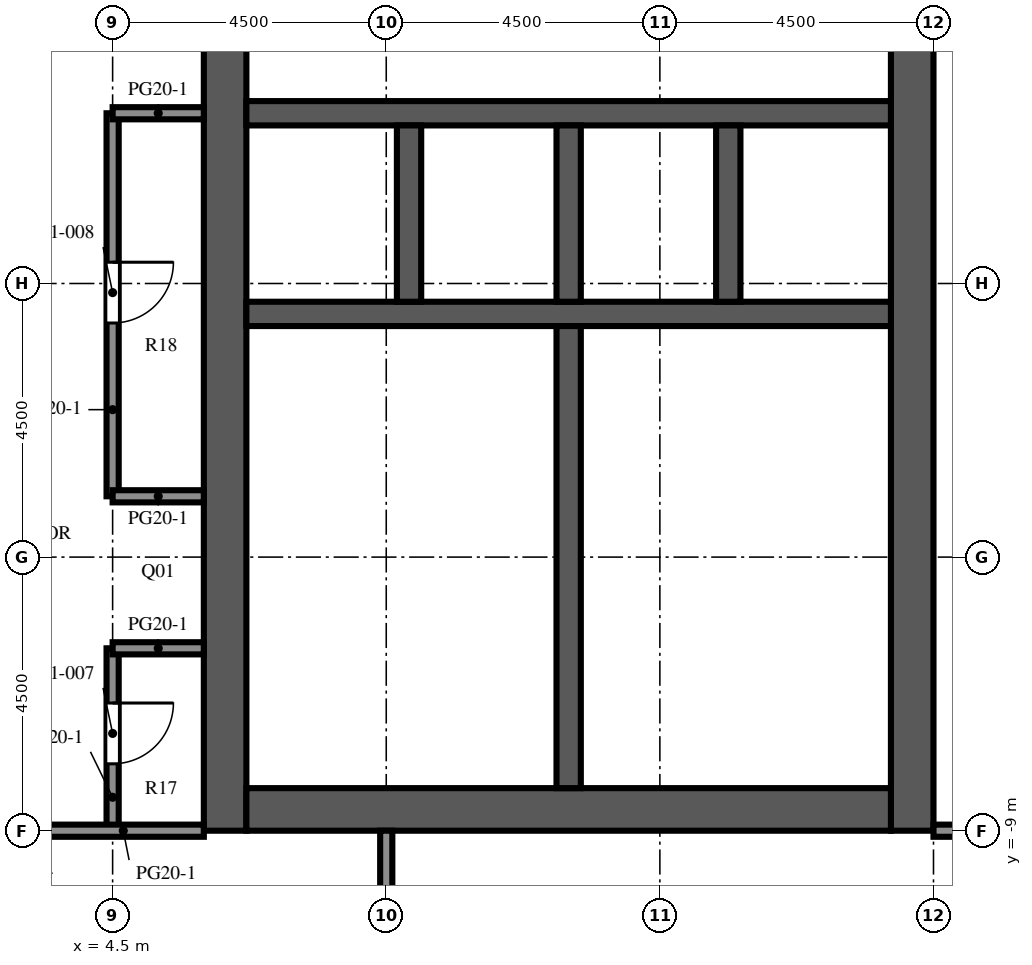
"""IFC4 building model, lengths in metres.
Left out: names, types, materials, properties, quantities, classifications, styles, units other than length and angle.
Written with IfcOpenShell. Run it as: python <this file> out.ifc"""

import sys

from ifc_helpers import new_model, si_unit, direction, frame, frame_2d, origin, place, context, subcontext, project, spatial, rectangle, extrude, element, fill, save


model = new_model("IFC4")
c1 = context("Model", 3, precision=1e-05, world=origin(), true_north=direction((0.0, 1.0)))
c2 = subcontext(c1, "Body", "Model", "MODEL_VIEW")
j1 = project(units=[si_unit("LENGTHUNIT", "METRE"), si_unit("PLANEANGLEUNIT", "RADIAN")], contexts=[c1])
p1 = place(None, origin())
s1 = spatial("IfcSite", under=j1, at=p1, CompositionType="ELEMENT")
p2 = place(p1, origin())
s2 = spatial("IfcBuilding", under=s1, at=p2, CompositionType="ELEMENT")
p3 = place(p2, frame((0.0, 0.0, 278.6)))
s3 = spatial("IfcBuildingStorey", under=s2, at=p3, CompositionType="ELEMENT", Elevation=278.6)
p4 = place(p3, frame((6.35, -9.0, 0.0), z_axis=(0.0, 0.0, 1.0), x_axis=(0.0, 1.0, 0.0)))
e1 = element("IfcWall", 1, at=p4, inside=s3, PredefinedType="SHEAR", context=c2, shape_type="SweptSolid", body=[
    extrude(rectangle(XDim=27.5, YDim=0.7, at=frame_2d((13.75, 0.0))), origin(), (0.0, 0.0, 1.0), 4.1),
])
p5 = place(p4, frame((12.55, 0.0, 0.0)))
e2 = element("IfcOpeningElement", 2, at=p5, cuts=e1, PredefinedType="OPENING", context=c2, shape_type="SweptSolid", body=[
    extrude(rectangle(XDim=2.4, YDim=2.4, at=frame_2d((1.2, 1.2))), frame((0.0, 0.36, 0.0), z_axis=(0.0, -1.0, 0.0), x_axis=(1.0, 0.0, 0.0)), (0.0, 0.0, 1.0), 0.72),
])
p6 = place(p4, frame((3.9, 0.0, 0.0)))
e3 = element("IfcOpeningElement", 3, at=p6, cuts=e1, PredefinedType="OPENING", context=c2, shape_type="SweptSolid", body=[
    extrude(rectangle(XDim=1.2, YDim=2.1, at=frame_2d((0.6, 1.05))), frame((0.0, 0.36, 0.0), z_axis=(0.0, -1.0, 0.0), x_axis=(1.0, 0.0, 0.0)), (0.0, 0.0, 1.0), 0.72),
])
p7 = place(p4, frame((19.46, 0.0, 0.0)))
e4 = element("IfcOpeningElement", 4, at=p7, cuts=e1, PredefinedType="OPENING", context=c2, shape_type="SweptSolid", body=[
    extrude(rectangle(XDim=1.0, YDim=2.1, at=frame_2d((0.5, 1.05))), frame((0.0, 0.36, 0.0), z_axis=(0.0, -1.0, 0.0), x_axis=(1.0, 0.0, 0.0)), (0.0, 0.0, 1.0), 0.72),
])
p8 = place(p4, frame((21.17, 0.0, 0.0)))
e5 = element("IfcOpeningElement", 5, at=p8, cuts=e1, PredefinedType="OPENING", context=c2, shape_type="SweptSolid", body=[
    extrude(rectangle(XDim=1.0, YDim=2.1, at=frame_2d((0.5, 1.05))), frame((0.0, 0.36, 0.0), z_axis=(0.0, -1.0, 0.0), x_axis=(1.0, 0.0, 0.0)), (0.0, 0.0, 1.0), 0.72),
])
p9 = place(p4, frame((23.26, 0.0, 0.0)))
e6 = element("IfcOpeningElement", 6, at=p9, cuts=e1, PredefinedType="OPENING", context=c2, shape_type="SweptSolid", body=[
    extrude(rectangle(XDim=1.0, YDim=2.1, at=frame_2d((0.5, 1.05))), frame((0.0, 0.36, 0.0), z_axis=(0.0, -1.0, 0.0), x_axis=(1.0, 0.0, 0.0)), (0.0, 0.0, 1.0), 0.72),
])
p10 = place(p4, frame((25.35, 0.0, 0.0)))
e7 = element("IfcOpeningElement", 7, at=p10, cuts=e1, PredefinedType="OPENING", context=c2, shape_type="SweptSolid", body=[
    extrude(rectangle(XDim=1.0, YDim=2.1, at=frame_2d((0.5, 1.05))), frame((0.0, 0.36, 0.0), z_axis=(0.0, -1.0, 0.0), x_axis=(1.0, 0.0, 0.0)), (0.0, 0.0, 1.0), 0.72),
])
p11 = place(p3, frame((17.65, -9.0, 0.0), z_axis=(0.0, 0.0, 1.0), x_axis=(0.0, 1.0, 0.0)))
e8 = element("IfcWall", 8, at=p11, inside=s3, PredefinedType="SHEAR", context=c2, shape_type="SweptSolid", body=[
    extrude(rectangle(XDim=27.5, YDim=0.7, at=frame_2d((13.75, 0.0))), origin(), (0.0, 0.0, 1.0), 4.1),
])
p12 = place(p11, frame((12.55, 0.0, 0.0)))
e9 = element("IfcOpeningElement", 9, at=p12, cuts=e8, PredefinedType="OPENING", context=c2, shape_type="SweptSolid", body=[
    extrude(rectangle(XDim=2.4, YDim=2.4, at=frame_2d((1.2, 1.2))), frame((0.0, 0.36, 0.0), z_axis=(0.0, -1.0, 0.0), x_axis=(1.0, 0.0, 0.0)), (0.0, 0.0, 1.0), 0.72),
])
p13 = place(p11, frame((6.825, 0.0, 0.0)))
e10 = element("IfcOpeningElement", 10, at=p13, cuts=e8, PredefinedType="OPENING", context=c2, shape_type="SweptSolid", body=[
    extrude(rectangle(XDim=1.2, YDim=2.1, at=frame_2d((0.6, 1.05))), frame((0.0, 0.36, 0.0), z_axis=(0.0, -1.0, 0.0), x_axis=(1.0, 0.0, 0.0)), (0.0, 0.0, 1.0), 0.72),
])
p14 = place(p11, frame((19.475, 0.0, 0.0)))
e11 = element("IfcOpeningElement", 11, at=p14, cuts=e8, PredefinedType="OPENING", context=c2, shape_type="SweptSolid", body=[
    extrude(rectangle(XDim=1.2, YDim=2.1, at=frame_2d((0.6, 1.05))), frame((0.0, 0.36, 0.0), z_axis=(0.0, -1.0, 0.0), x_axis=(1.0, 0.0, 0.0)), (0.0, 0.0, 1.0), 0.72),
])
p15 = place(p3, frame((6.7, -8.65, 0.0), z_axis=(0.0, 0.0, 1.0), x_axis=(1.0, 0.0, 0.0)))
e12 = element("IfcWall", 12, at=p15, inside=s3, PredefinedType="SHEAR", context=c2, shape_type="SweptSolid", body=[
    extrude(rectangle(XDim=10.6, YDim=0.7, at=frame_2d((5.3, 0.0))), origin(), (0.0, 0.0, 1.0), 4.1),
])
p16 = place(p3, frame((6.7, -0.5, 0.0), z_axis=(0.0, 0.0, 1.0), x_axis=(1.0, 0.0, 0.0)))
e13 = element("IfcWall", 13, at=p16, inside=s3, PredefinedType="SHEAR", context=c2, shape_type="SweptSolid", body=[
    extrude(rectangle(XDim=10.6, YDim=0.4, at=frame_2d((5.3, 0.0))), origin(), (0.0, 0.0, 1.0), 4.1),
])
p17 = place(p3, frame((6.7, 2.8, 0.0), z_axis=(0.0, 0.0, 1.0), x_axis=(1.0, 0.0, 0.0)))
e14 = element("IfcWall", 14, at=p17, inside=s3, PredefinedType="SHEAR", context=c2, shape_type="SweptSolid", body=[
    extrude(rectangle(XDim=10.6, YDim=0.4, at=frame_2d((5.3, 0.0))), origin(), (0.0, 0.0, 1.0), 4.1),
])
p18 = place(p17, frame((0.688, 0.0, 0.0)))
e15 = element("IfcOpeningElement", 15, at=p18, cuts=e14, PredefinedType="OPENING", context=c2, shape_type="SweptSolid", body=[
    extrude(rectangle(XDim=1.1, YDim=2.1, at=frame_2d((0.55, 1.05))), frame((0.0, 0.21, 0.0), z_axis=(0.0, -1.0, 0.0), x_axis=(1.0, 0.0, 0.0)), (0.0, 0.0, 1.0), 0.42),
])
p19 = place(p17, frame((3.438, 0.0, 0.0)))
e16 = element("IfcOpeningElement", 16, at=p19, cuts=e14, PredefinedType="OPENING", context=c2, shape_type="SweptSolid", body=[
    extrude(rectangle(XDim=1.1, YDim=2.1, at=frame_2d((0.55, 1.05))), frame((0.0, 0.21, 0.0), z_axis=(0.0, -1.0, 0.0), x_axis=(1.0, 0.0, 0.0)), (0.0, 0.0, 1.0), 0.42),
])
p20 = place(p17, frame((6.113, 0.0, 0.0)))
e17 = element("IfcOpeningElement", 17, at=p20, cuts=e14, PredefinedType="OPENING", context=c2, shape_type="SweptSolid", body=[
    extrude(rectangle(XDim=1.0, YDim=2.1, at=frame_2d((0.5, 1.05))), frame((0.0, 0.21, 0.0), z_axis=(0.0, -1.0, 0.0), x_axis=(1.0, 0.0, 0.0)), (0.0, 0.0, 1.0), 0.42),
])
p21 = place(p17, frame((8.863, 0.0, 0.0)))
e18 = element("IfcOpeningElement", 18, at=p21, cuts=e14, PredefinedType="OPENING", context=c2, shape_type="SweptSolid", body=[
    extrude(rectangle(XDim=1.0, YDim=2.1, at=frame_2d((0.5, 1.05))), frame((0.0, 0.21, 0.0), z_axis=(0.0, -1.0, 0.0), x_axis=(1.0, 0.0, 0.0)), (0.0, 0.0, 1.0), 0.42),
])
for number, where, z_axis, x_axis in (
    (19, (9.375, -0.3, 0.0), (0.0, 0.0, 1.0), (0.0, 1.0, 0.0)),
    (20, (12.0, -0.3, 0.0), (0.0, 0.0, 1.0), (0.0, 1.0, 0.0)),
    (21, (14.625, -0.3, 0.0), (0.0, 0.0, 1.0), (0.0, 1.0, 0.0)),
):
    element("IfcWall", number, at=place(p3, frame(where, z_axis=z_axis, x_axis=x_axis)), inside=s3, PredefinedType="SHEAR", context=c2, shape_type="SweptSolid", body=[
        extrude(rectangle(XDim=2.9, YDim=0.4, at=frame_2d((1.45, 0.0))), origin(), (0.0, 0.0, 1.0), 4.1),
    ])
p22 = place(p3, frame((12.0, -8.3, 0.0), z_axis=(0.0, 0.0, 1.0), x_axis=(0.0, 1.0, 0.0)))
e22 = element("IfcWall", 22, at=p22, inside=s3, PredefinedType="SHEAR", context=c2, shape_type="SweptSolid", body=[
    extrude(rectangle(XDim=7.6, YDim=0.4, at=frame_2d((3.8, 0.0))), origin(), (0.0, 0.0, 1.0), 4.1),
])
p23 = place(p3, frame((6.7, -6.02, 0.0), z_axis=(0.0, 0.0, 1.0), x_axis=(1.0, 0.0, 0.0)))
e23 = element("IfcWall", 23, at=p23, inside=s3, PredefinedType="PARTITIONING", context=c2, shape_type="SweptSolid", body=[
    extrude(rectangle(XDim=1.6, YDim=0.1, at=frame_2d((0.8, 0.0))), origin(), (0.0, 0.0, 1.0), 3.65),
])
p24 = place(p23, frame((0.3, 0.0, 0.0)))
e24 = element("IfcOpeningElement", 24, at=p24, cuts=e23, PredefinedType="OPENING", context=c2, shape_type="SweptSolid", body=[
    extrude(rectangle(XDim=1.0, YDim=2.1, at=frame_2d((0.5, 1.05))), frame((0.0, 0.06, 0.0), z_axis=(0.0, -1.0, 0.0), x_axis=(1.0, 0.0, 0.0)), (0.0, 0.0, 1.0), 0.12),
])
p25 = place(p3, frame((6.7, -2.98, 0.0), z_axis=(0.0, 0.0, 1.0), x_axis=(1.0, 0.0, 0.0)))
e25 = element("IfcWall", 25, at=p25, inside=s3, PredefinedType="PARTITIONING", context=c2, shape_type="SweptSolid", body=[
    extrude(rectangle(XDim=1.6, YDim=0.1, at=frame_2d((0.8, 0.0))), origin(), (0.0, 0.0, 1.0), 3.65),
])
p26 = place(p25, frame((0.3, 0.0, 0.0)))
e26 = element("IfcOpeningElement", 26, at=p26, cuts=e25, PredefinedType="OPENING", context=c2, shape_type="SweptSolid", body=[
    extrude(rectangle(XDim=1.0, YDim=2.1, at=frame_2d((0.5, 1.05))), frame((0.0, 0.06, 0.0), z_axis=(0.0, -1.0, 0.0), x_axis=(1.0, 0.0, 0.0)), (0.0, 0.0, 1.0), 0.12),
])
p27 = place(p3, frame((8.3, -6.02, 0.0), z_axis=(0.0, 0.0, 1.0), x_axis=(0.0, 1.0, 0.0)))
e27 = element("IfcWall", 27, at=p27, inside=s3, PredefinedType="PARTITIONING", context=c2, shape_type="SweptSolid", body=[
    extrude(rectangle(XDim=3.04, YDim=0.1, at=frame_2d((1.52, 0.0))), origin(), (0.0, 0.0, 1.0), 3.65),
])
p28 = place(p27, frame((1.02, 0.0, 0.0)))
e28 = element("IfcOpeningElement", 28, at=p28, cuts=e27, PredefinedType="OPENING", context=c2, shape_type="SweptSolid", body=[
    extrude(rectangle(XDim=1.0, YDim=2.1, at=frame_2d((0.5, 1.05))), frame((0.0, 0.06, 0.0), z_axis=(0.0, -1.0, 0.0), x_axis=(1.0, 0.0, 0.0)), (0.0, 0.0, 1.0), 0.12),
])
for number, where, z_axis, x_axis in (
    (29, (8.3, -6.02, 0.0), (0.0, 0.0, 1.0), (1.0, 0.0, 0.0)),
    (30, (8.3, -2.98, 0.0), (0.0, 0.0, 1.0), (1.0, 0.0, 0.0)),
):
    element("IfcWall", number, at=place(p3, frame(where, z_axis=z_axis, x_axis=x_axis)), inside=s3, PredefinedType="PARTITIONING", context=c2, shape_type="SweptSolid", body=[
        extrude(rectangle(XDim=3.5, YDim=0.1, at=frame_2d((1.75, 0.0))), origin(), (0.0, 0.0, 1.0), 3.65),
    ])
p29 = place(p3, frame((4.5, -6.0, 0.0), z_axis=(0.0, 0.0, 1.0), x_axis=(0.0, -1.0, 0.0)))
e31 = element("IfcWall", 31, at=p29, inside=s3, PredefinedType="PARTITIONING", context=c2, shape_type="SweptSolid", body=[
    extrude(rectangle(XDim=3.0, YDim=0.2, at=frame_2d((1.5, 0.0))), origin(), (0.0, 0.0, 1.0), 3.65),
])
p30 = place(p29, frame((0.9, 0.0, 0.0)))
e32 = element("IfcOpeningElement", 32, at=p30, cuts=e31, PredefinedType="OPENING", context=c2, shape_type="SweptSolid", body=[
    extrude(rectangle(XDim=1.0, YDim=2.1, at=frame_2d((0.5, 1.05))), frame((0.0, 0.11, 0.0), z_axis=(0.0, -1.0, 0.0), x_axis=(1.0, 0.0, 0.0)), (0.0, 0.0, 1.0), 0.22),
])
p31 = place(p3, frame((4.5, 2.8, 0.0), z_axis=(0.0, 0.0, 1.0), x_axis=(0.0, -1.0, 0.0)))
e33 = element("IfcWall", 33, at=p31, inside=s3, PredefinedType="PARTITIONING", context=c2, shape_type="SweptSolid", body=[
    extrude(rectangle(XDim=6.3, YDim=0.2, at=frame_2d((3.15, 0.0))), origin(), (0.0, 0.0, 1.0), 3.65),
])
p32 = place(p31, frame((2.45, 0.0, 0.0)))
e34 = element("IfcOpeningElement", 34, at=p32, cuts=e33, PredefinedType="OPENING", context=c2, shape_type="SweptSolid", body=[
    extrude(rectangle(XDim=1.0, YDim=2.1, at=frame_2d((0.5, 1.05))), frame((0.0, 0.11, 0.0), z_axis=(0.0, -1.0, 0.0), x_axis=(1.0, 0.0, 0.0)), (0.0, 0.0, 1.0), 0.22),
])
p33 = place(p3, frame((9.0, -17.6, 0.0), z_axis=(0.0, 0.0, 1.0), x_axis=(0.0, 1.0, 0.0)))
e35 = element("IfcWall", 35, at=p33, inside=s3, PredefinedType="PARTITIONING", context=c2, shape_type="SweptSolid", body=[
    extrude(rectangle(XDim=8.6, YDim=0.2, at=frame_2d((4.3, 0.0))), origin(), (0.0, 0.0, 1.0), 3.65),
])
p34 = place(p3, frame((6.0, -9.0, 0.0), z_axis=(0.0, 0.0, 1.0), x_axis=(-1.0, 0.0, 0.0)))
e36 = element("IfcWall", 36, at=p34, inside=s3, PredefinedType="PARTITIONING", context=c2, shape_type="SweptSolid", body=[
    extrude(rectangle(XDim=4.5, YDim=0.2, at=frame_2d((2.25, 0.0))), origin(), (0.0, 0.0, 1.0), 3.65),
])
p35 = place(p34, frame((2.65, 0.0, 0.0)))
e37 = element("IfcOpeningElement", 37, at=p35, cuts=e36, PredefinedType="OPENING", context=c2, shape_type="SweptSolid", body=[
    extrude(rectangle(XDim=1.0, YDim=2.1, at=frame_2d((0.5, 1.05))), frame((0.0, 0.11, 0.0), z_axis=(0.0, -1.0, 0.0), x_axis=(1.0, 0.0, 0.0)), (0.0, 0.0, 1.0), 0.22),
])
p36 = place(p3, frame((22.1, -9.0, 0.0), z_axis=(0.0, 0.0, 1.0), x_axis=(-1.0, 0.0, 0.0)))
e38 = element("IfcWall", 38, at=p36, inside=s3, PredefinedType="PARTITIONING", context=c2, shape_type="SweptSolid", body=[
    extrude(rectangle(XDim=4.1, YDim=0.2, at=frame_2d((2.05, 0.0))), origin(), (0.0, 0.0, 1.0), 3.65),
])
p37 = place(p36, frame((0.75, 0.0, 0.0)))
e39 = element("IfcOpeningElement", 39, at=p37, cuts=e38, PredefinedType="OPENING", context=c2, shape_type="SweptSolid", body=[
    extrude(rectangle(XDim=1.0, YDim=2.1, at=frame_2d((0.5, 1.05))), frame((0.0, 0.11, 0.0), z_axis=(0.0, -1.0, 0.0), x_axis=(1.0, 0.0, 0.0)), (0.0, 0.0, 1.0), 0.22),
])
for number, where, z_axis, x_axis in (
    (40, (4.5, -6.0, 0.0), (0.0, 0.0, 1.0), (1.0, 0.0, 0.0)),
    (41, (4.5, -3.5, 0.0), (0.0, 0.0, 1.0), (1.0, 0.0, 0.0)),
    (42, (4.5, 2.8, 0.0), (0.0, 0.0, 1.0), (1.0, 0.0, 0.0)),
):
    element("IfcWall", number, at=place(p3, frame(where, z_axis=z_axis, x_axis=x_axis)), inside=s3, PredefinedType="PARTITIONING", context=c2, shape_type="SweptSolid", body=[
        extrude(rectangle(XDim=1.5, YDim=0.2, at=frame_2d((0.75, 0.0))), origin(), (0.0, 0.0, 1.0), 3.65),
    ])
p38 = place(p18, origin())
e43 = element("IfcDoor", 43, at=p38, inside=s3, OperationType="DOUBLE_DOOR_SLIDING", PredefinedType="DOOR", context=c2, shape_type="SweptSolid", body=[
    extrude(rectangle(XDim=1.1, YDim=2.1, at=frame_2d((0.55, 1.05))), frame((0.0, 0.025, 0.0), z_axis=(0.0, -1.0, 0.0), x_axis=(1.0, 0.0, 0.0)), (0.0, 0.0, 1.0), 0.05),
])
fill(e15, e43)
p39 = place(p19, origin())
e44 = element("IfcDoor", 44, at=p39, inside=s3, OperationType="DOUBLE_DOOR_SLIDING", PredefinedType="DOOR", context=c2, shape_type="SweptSolid", body=[
    extrude(rectangle(XDim=1.1, YDim=2.1, at=frame_2d((0.55, 1.05))), frame((0.0, 0.025, 0.0), z_axis=(0.0, -1.0, 0.0), x_axis=(1.0, 0.0, 0.0)), (0.0, 0.0, 1.0), 0.05),
])
fill(e16, e44)
p40 = place(p5, origin())
e45 = element("IfcDoor", 45, at=p40, inside=s3, OperationType="DOUBLE_DOOR_DOUBLE_SWING", PredefinedType="DOOR", context=c2, shape_type="SweptSolid", body=[
    extrude(rectangle(XDim=2.4, YDim=2.4, at=frame_2d((1.2, 1.2))), frame((0.0, 0.025, 0.0), z_axis=(0.0, -1.0, 0.0), x_axis=(1.0, 0.0, 0.0)), (0.0, 0.0, 1.0), 0.05),
])
fill(e2, e45)
p41 = place(p12, origin())
e46 = element("IfcDoor", 46, at=p41, inside=s3, OperationType="DOUBLE_DOOR_DOUBLE_SWING", PredefinedType="DOOR", context=c2, shape_type="SweptSolid", body=[
    extrude(rectangle(XDim=2.4, YDim=2.4, at=frame_2d((1.2, 1.2))), frame((0.0, 0.025, 0.0), z_axis=(0.0, -1.0, 0.0), x_axis=(1.0, 0.0, 0.0)), (0.0, 0.0, 1.0), 0.05),
])
fill(e9, e46)
p42 = place(p13, frame((1.2, 0.0, 0.0), z_axis=(0.0, 0.0, 1.0), x_axis=(-1.0, 0.0, 0.0)))
e47 = element("IfcDoor", 47, at=p42, inside=s3, OperationType="SINGLE_SWING_LEFT", PredefinedType="DOOR", context=c2, shape_type="SweptSolid", body=[
    extrude(rectangle(XDim=1.2, YDim=2.1, at=frame_2d((0.6, 1.05))), frame((0.0, 0.025, 0.0), z_axis=(0.0, -1.0, 0.0), x_axis=(1.0, 0.0, 0.0)), (0.0, 0.0, 1.0), 0.05),
])
fill(e10, e47)
p43 = place(p20, origin())
e48 = element("IfcDoor", 48, at=p43, inside=s3, OperationType="SINGLE_SWING_LEFT", PredefinedType="DOOR", context=c2, shape_type="SweptSolid", body=[
    extrude(rectangle(XDim=1.0, YDim=2.1, at=frame_2d((0.5, 1.05))), frame((0.0, 0.025, 0.0), z_axis=(0.0, -1.0, 0.0), x_axis=(1.0, 0.0, 0.0)), (0.0, 0.0, 1.0), 0.05),
])
fill(e17, e48)
p44 = place(p21, origin())
e49 = element("IfcDoor", 49, at=p44, inside=s3, OperationType="SINGLE_SWING_RIGHT", PredefinedType="DOOR", context=c2, shape_type="SweptSolid", body=[
    extrude(rectangle(XDim=1.0, YDim=2.1, at=frame_2d((0.5, 1.05))), frame((0.0, 0.025, 0.0), z_axis=(0.0, -1.0, 0.0), x_axis=(1.0, 0.0, 0.0)), (0.0, 0.0, 1.0), 0.05),
])
fill(e18, e49)
p45 = place(p6, origin())
e50 = element("IfcDoor", 50, at=p45, inside=s3, OperationType="SINGLE_SWING_RIGHT", PredefinedType="DOOR", context=c2, shape_type="SweptSolid", body=[
    extrude(rectangle(XDim=1.2, YDim=2.1, at=frame_2d((0.6, 1.05))), frame((0.0, -0.275, 0.0), z_axis=(0.0, -1.0, 0.0), x_axis=(1.0, 0.0, 0.0)), (0.0, 0.0, 1.0), 0.05),
])
fill(e3, e50)
p46 = place(p24, origin())
e51 = element("IfcDoor", 51, at=p46, inside=s3, OperationType="SINGLE_SWING_LEFT", PredefinedType="DOOR", context=c2, shape_type="SweptSolid", body=[
    extrude(rectangle(XDim=1.0, YDim=2.1, at=frame_2d((0.5, 1.05))), frame((0.0, 0.025, 0.0), z_axis=(0.0, -1.0, 0.0), x_axis=(1.0, 0.0, 0.0)), (0.0, 0.0, 1.0), 0.05),
])
fill(e24, e51)
p47 = place(p26, origin())
e52 = element("IfcDoor", 52, at=p47, inside=s3, OperationType="SINGLE_SWING_RIGHT", PredefinedType="DOOR", context=c2, shape_type="SweptSolid", body=[
    extrude(rectangle(XDim=1.0, YDim=2.1, at=frame_2d((0.5, 1.05))), frame((0.0, 0.025, 0.0), z_axis=(0.0, -1.0, 0.0), x_axis=(1.0, 0.0, 0.0)), (0.0, 0.0, 1.0), 0.05),
])
fill(e26, e52)
p48 = place(p28, origin())
e53 = element("IfcDoor", 53, at=p48, inside=s3, OperationType="SINGLE_SWING_LEFT", PredefinedType="DOOR", context=c2, shape_type="SweptSolid", body=[
    extrude(rectangle(XDim=1.0, YDim=2.1, at=frame_2d((0.5, 1.05))), frame((0.0, 0.025, 0.0), z_axis=(0.0, -1.0, 0.0), x_axis=(1.0, 0.0, 0.0)), (0.0, 0.0, 1.0), 0.05),
])
fill(e28, e53)
p49 = place(p30, origin())
e54 = element("IfcDoor", 54, at=p49, inside=s3, OperationType="SINGLE_SWING_LEFT", PredefinedType="DOOR", context=c2, shape_type="SweptSolid", body=[
    extrude(rectangle(XDim=1.0, YDim=2.1, at=frame_2d((0.5, 1.05))), frame((0.0, 0.025, 0.0), z_axis=(0.0, -1.0, 0.0), x_axis=(1.0, 0.0, 0.0)), (0.0, 0.0, 1.0), 0.05),
])
fill(e32, e54)
p50 = place(p32, origin())
e55 = element("IfcDoor", 55, at=p50, inside=s3, OperationType="SINGLE_SWING_LEFT", PredefinedType="DOOR", context=c2, shape_type="SweptSolid", body=[
    extrude(rectangle(XDim=1.0, YDim=2.1, at=frame_2d((0.5, 1.05))), frame((0.0, 0.025, 0.0), z_axis=(0.0, -1.0, 0.0), x_axis=(1.0, 0.0, 0.0)), (0.0, 0.0, 1.0), 0.05),
])
fill(e34, e55)
save(model, sys.argv[1])
